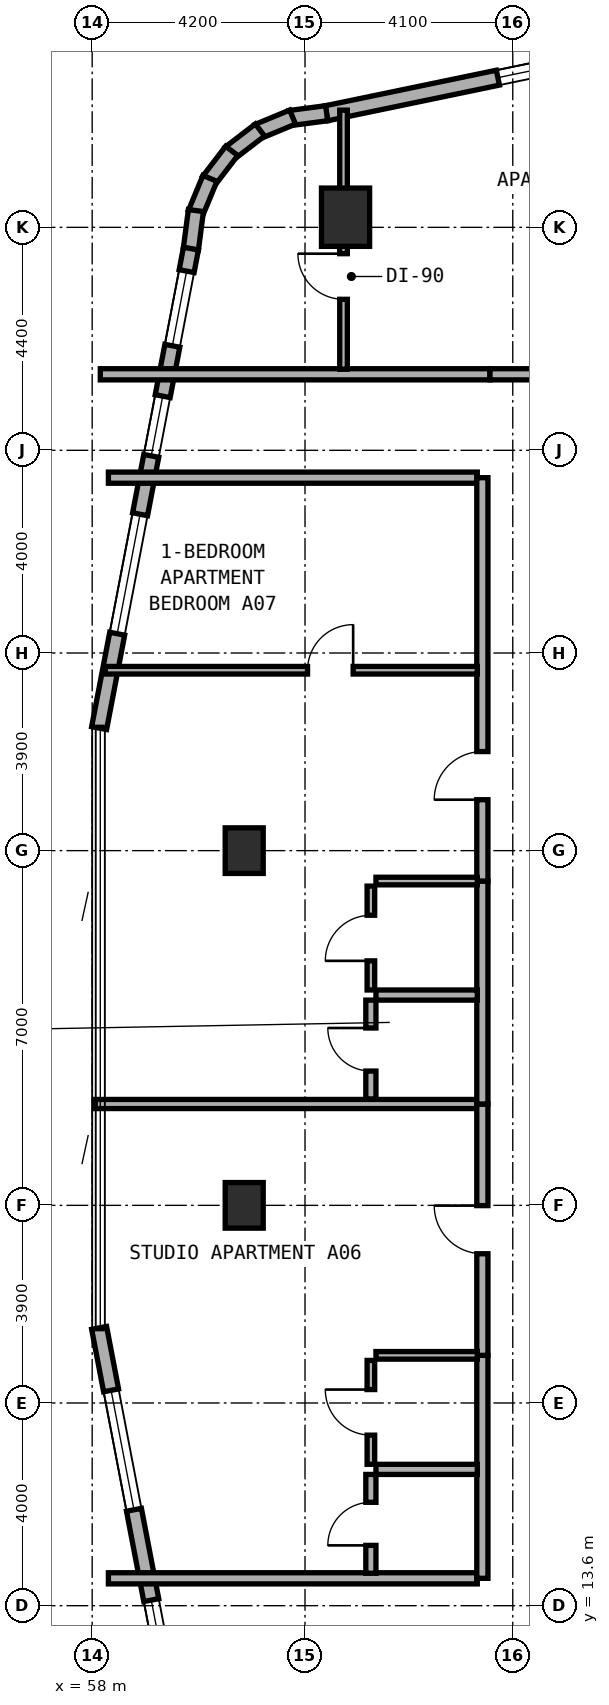
"""IFC4 building model, lengths in metres.
Left out: names, types, materials, properties, quantities, classifications, styles, units other than length and angle.
Written with IfcOpenShell. Run it as: python <this file> out.ifc"""

import sys

from ifc_helpers import new_model, si_unit, direction, frame, frame_2d, origin, origin_2d, place, context, subcontext, project, spatial, rectangle, extrude, element, fill, save


model = new_model("IFC4")
c1 = context("Model", 3, precision=1e-05, world=origin(), true_north=direction((0.0, 1.0)))
c2 = subcontext(c1, "Body", "Model", "MODEL_VIEW")
j1 = project(units=[si_unit("LENGTHUNIT", "METRE"), si_unit("PLANEANGLEUNIT", "RADIAN")], contexts=[c1])
p1 = place(None, origin())
s1 = spatial("IfcSite", under=j1, at=p1, CompositionType="ELEMENT")
p2 = place(p1, origin())
s2 = spatial("IfcBuilding", under=s1, at=p2, CompositionType="ELEMENT")
p3 = place(p2, frame((0.0, 0.0, 59.0)))
s3 = spatial("IfcBuildingStorey", under=s2, at=p3, CompositionType="ELEMENT", Elevation=59.0)
for number, where, z_axis, x_axis in (
    (1, (61.0, 21.5, 0.0), (0.0, 0.0, 1.0), (1.0, 0.0, 0.0)),
    (2, (61.0, 28.5, 0.0), (0.0, 0.0, 1.0), (1.0, 0.0, 0.0)),
):
    element("IfcColumn", number, at=place(p3, frame(where, z_axis=z_axis, x_axis=x_axis)), inside=s3, PredefinedType="COLUMN", context=c2, shape_type="SweptSolid", body=[
        extrude(rectangle(XDim=0.75, YDim=0.9, at=origin_2d()), origin(), (0.0, 0.0, 1.0), 3.5),
    ])
p4 = place(p3, frame((63.0, 41.0, 0.0), z_axis=(0.0, 0.0, 1.0), x_axis=(1.0, 0.0, 0.0)))
e3 = element("IfcColumn", 3, at=p4, inside=s3, PredefinedType="COLUMN", context=c2, shape_type="SweptSolid", body=[
    extrude(rectangle(XDim=0.95, YDim=1.15, at=origin_2d()), origin(), (0.0, 0.0, 1.0), 3.5),
])
p5 = place(p3, frame((71.326, 44.858, 0.0), z_axis=(0.0, 0.0, 1.0), x_axis=(-0.979124350489, -0.203262161453, 0.0)))
e4 = element("IfcWall", 4, at=p5, inside=s3, PredefinedType="STANDARD", context=c2, shape_type="SweptSolid", body=[
    extrude(rectangle(XDim=8.889, YDim=0.3, at=frame_2d((4.445, 0.0))), origin(), (0.0, 0.0, 1.0), 3.25),
])
p6 = place(p5, frame((3.033, 0.0, 0.8)))
e5 = element("IfcOpeningElement", 5, at=p6, cuts=e4, PredefinedType="OPENING", context=c2, shape_type="SweptSolid", body=[
    extrude(rectangle(XDim=2.4, YDim=1.6, at=frame_2d((1.2, 0.8))), frame((0.0, 0.16, 0.0), z_axis=(0.0, -1.0, 0.0), x_axis=(1.0, 0.0, 0.0)), (0.0, 0.0, 1.0), 0.32),
])
p7 = place(p3, frame((62.627, 43.052, 0.0), z_axis=(0.0, 0.0, 1.0), x_axis=(-0.991480488834, -0.130255288807, 0.0)))
e6 = element("IfcWall", 6, at=p7, inside=s3, PredefinedType="STANDARD", context=c2, shape_type="SweptSolid", body=[
    extrude(rectangle(XDim=0.729, YDim=0.3, at=frame_2d((0.365, 0.0))), origin(), (0.0, 0.0, 1.0), 3.25),
])
for number, where, z_axis, x_axis in (
    (7, (61.955, 42.976, 0.0), (0.0, 0.0, 1.0), (-0.924, -0.384, 0.0)),
    (8, (61.311, 42.721, 0.0), (0.0, 0.0, 1.0), (-0.794, -0.608, 0.0)),
    (9, (60.754, 42.309, 0.0), (0.0, 0.0, 1.0), (-0.608, -0.794, 0.0)),
    (10, (60.324, 41.766, 0.0), (0.0, 0.0, 1.0), (-0.383, -0.924, 0.0)),
):
    element("IfcWall", number, at=place(p3, frame(where, z_axis=z_axis, x_axis=x_axis)), inside=s3, PredefinedType="STANDARD", context=c2, shape_type="SweptSolid", body=[
        extrude(rectangle(XDim=0.746, YDim=0.3, at=frame_2d((0.373, 0.0))), origin(), (0.0, 0.0, 1.0), 3.25),
    ])
p8 = place(p3, frame((60.047, 41.131, 0.0), z_axis=(0.0, 0.0, 1.0), x_axis=(-0.129653178221, -0.991559404866, 0.0)))
e11 = element("IfcWall", 11, at=p8, inside=s3, PredefinedType="STANDARD", context=c2, shape_type="SweptSolid", body=[
    extrude(rectangle(XDim=0.764, YDim=0.3, at=frame_2d((0.382, 0.0))), origin(), (0.0, 0.0, 1.0), 3.25),
])
p9 = place(p3, frame((59.949, 40.38, 0.0), z_axis=(0.0, 0.0, 1.0), x_axis=(-0.188087874316, -0.982152203854, 0.0)))
e12 = element("IfcWall", 12, at=p9, inside=s3, PredefinedType="STANDARD", context=c2, shape_type="SweptSolid", body=[
    extrude(rectangle(XDim=9.634, YDim=0.3, at=frame_2d((4.817, 0.0))), origin(), (0.0, 0.0, 1.0), 3.25),
])
p10 = place(p9, frame((0.452, 0.0, 0.85)))
e13 = element("IfcOpeningElement", 13, at=p10, cuts=e12, PredefinedType="OPENING", context=c2, shape_type="SweptSolid", body=[
    extrude(rectangle(XDim=1.5, YDim=1.5, at=frame_2d((0.75, 0.75))), frame((0.0, 0.16, 0.0), z_axis=(0.0, -1.0, 0.0), x_axis=(1.0, 0.0, 0.0)), (0.0, 0.0, 1.0), 0.32),
])
p11 = place(p9, frame((2.964, 0.0, 0.85)))
e14 = element("IfcOpeningElement", 14, at=p11, cuts=e12, PredefinedType="OPENING", context=c2, shape_type="SweptSolid", body=[
    extrude(rectangle(XDim=1.2, YDim=1.5, at=frame_2d((0.6, 0.75))), frame((0.0, 0.16, 0.0), z_axis=(0.0, -1.0, 0.0), x_axis=(1.0, 0.0, 0.0)), (0.0, 0.0, 1.0), 0.32),
])
p12 = place(p9, frame((5.337, 0.0, 0.8)))
e15 = element("IfcOpeningElement", 15, at=p12, cuts=e12, PredefinedType="OPENING", context=c2, shape_type="SweptSolid", body=[
    extrude(rectangle(XDim=2.4, YDim=1.6, at=frame_2d((1.2, 0.8))), frame((0.0, 0.16, 0.0), z_axis=(0.0, -1.0, 0.0), x_axis=(1.0, 0.0, 0.0)), (0.0, 0.0, 1.0), 0.32),
])
p13 = place(p3, frame((58.137, 19.082, 0.0), z_axis=(0.0, 0.0, 1.0), x_axis=(0.188087874316, -0.982152203854, 0.0)))
e16 = element("IfcWall", 16, at=p13, inside=s3, PredefinedType="STANDARD", context=c2, shape_type="SweptSolid", body=[
    extrude(rectangle(XDim=9.634, YDim=0.3, at=frame_2d((4.817, 0.0))), origin(), (0.0, 0.0, 1.0), 3.25),
])
p14 = place(p13, frame((1.255, 0.0, 0.8)))
e17 = element("IfcOpeningElement", 17, at=p14, cuts=e16, PredefinedType="OPENING", context=c2, shape_type="SweptSolid", body=[
    extrude(rectangle(XDim=2.4, YDim=1.6, at=frame_2d((1.2, 0.8))), frame((0.0, 0.16, 0.0), z_axis=(0.0, -1.0, 0.0), x_axis=(1.0, 0.0, 0.0)), (0.0, 0.0, 1.0), 0.32),
])
p15 = place(p13, frame((5.47, 0.0, 0.85)))
e18 = element("IfcOpeningElement", 18, at=p15, cuts=e16, PredefinedType="OPENING", context=c2, shape_type="SweptSolid", body=[
    extrude(rectangle(XDim=1.2, YDim=1.5, at=frame_2d((0.6, 0.75))), frame((0.0, 0.16, 0.0), z_axis=(0.0, -1.0, 0.0), x_axis=(1.0, 0.0, 0.0)), (0.0, 0.0, 1.0), 0.32),
])
p16 = place(p13, frame((7.682, 0.0, 0.85)))
e19 = element("IfcOpeningElement", 19, at=p16, cuts=e16, PredefinedType="OPENING", context=c2, shape_type="SweptSolid", body=[
    extrude(rectangle(XDim=1.5, YDim=1.5, at=frame_2d((0.75, 0.75))), frame((0.0, 0.16, 0.0), z_axis=(0.0, -1.0, 0.0), x_axis=(1.0, 0.0, 0.0)), (0.0, 0.0, 1.0), 0.32),
])
p17 = place(p3, frame((58.16, 37.9, 0.0), z_axis=(0.0, 0.0, 1.0), x_axis=(1.0, 0.0, 0.0)))
e20 = element("IfcWall", 20, at=p17, inside=s3, PredefinedType="SOLIDWALL", context=c2, shape_type="SweptSolid", body=[
    extrude(rectangle(XDim=7.69, YDim=0.22, at=frame_2d((3.845, 0.0))), origin(), (0.0, 0.0, 1.0), 2.865),
])
p18 = place(p3, frame((65.85, 37.9, 0.0), z_axis=(0.0, 0.0, 1.0), x_axis=(1.0, 0.0, 0.0)))
e21 = element("IfcWall", 21, at=p18, inside=s3, PredefinedType="SOLIDWALL", context=c2, shape_type="SweptSolid", body=[
    extrude(rectangle(XDim=4.57, YDim=0.22, at=frame_2d((2.285, 0.0))), origin(), (0.0, 0.0, 1.0), 3.22),
])
p19 = place(p18, frame((1.81, 0.0, 0.0)))
e22 = element("IfcOpeningElement", 22, at=p19, cuts=e21, PredefinedType="OPENING", context=c2, shape_type="SweptSolid", body=[
    extrude(rectangle(XDim=0.95, YDim=2.1, at=frame_2d((0.475, 1.05))), frame((0.0, 0.12, 0.0), z_axis=(0.0, -1.0, 0.0), x_axis=(1.0, 0.0, 0.0)), (0.0, 0.0, 1.0), 0.24),
])
p20 = place(p3, frame((62.96, 38.0, 0.0), z_axis=(0.0, 0.0, 1.0), x_axis=(0.0, 1.0, 0.0)))
e23 = element("IfcWall", 23, at=p20, inside=s3, PredefinedType="PARTITIONING", context=c2, shape_type="SweptSolid", body=[
    extrude(rectangle(XDim=5.113, YDim=0.15, at=frame_2d((2.557, 0.0))), origin(), (0.0, 0.0, 1.0), 2.865),
])
p21 = place(p20, frame((1.38, 0.0, 0.0)))
e24 = element("IfcOpeningElement", 24, at=p21, cuts=e23, PredefinedType="OPENING", context=c2, shape_type="SweptSolid", body=[
    extrude(rectangle(XDim=0.9, YDim=2.1, at=frame_2d((0.45, 1.05))), frame((0.0, 0.085, 0.0), z_axis=(0.0, -1.0, 0.0), x_axis=(1.0, 0.0, 0.0)), (0.0, 0.0, 1.0), 0.17),
])
for number, where, z_axis, x_axis in (
    (25, (58.32, 14.14, 0.0), (0.0, 0.0, 1.0), (1.0, 0.0, 0.0)),
    (26, (58.32, 35.86, 0.0), (0.0, 0.0, 1.0), (1.0, 0.0, 0.0)),
):
    element("IfcWall", number, at=place(p3, frame(where, z_axis=z_axis, x_axis=x_axis)), inside=s3, PredefinedType="SOLIDWALL", context=c2, shape_type="SweptSolid", body=[
        extrude(rectangle(XDim=7.28, YDim=0.22, at=frame_2d((3.64, 0.0))), origin(), (0.0, 0.0, 1.0), 2.865),
    ])
p22 = place(p3, frame((58.06, 23.5, 0.0), z_axis=(0.0, 0.0, 1.0), x_axis=(1.0, 0.0, 0.0)))
e27 = element("IfcWall", 27, at=p22, inside=s3, PredefinedType="SOLIDWALL", context=c2, shape_type="SweptSolid", body=[
    extrude(rectangle(XDim=7.64, YDim=0.18, at=frame_2d((3.82, 0.0))), origin(), (0.0, 0.0, 1.0), 2.865),
])
p23 = place(p3, frame((65.7, 14.14, 0.0), z_axis=(0.0, 0.0, 1.0), x_axis=(0.0, 1.0, 0.0)))
e28 = element("IfcWall", 28, at=p23, inside=s3, PredefinedType="SOLIDWALL", context=c2, shape_type="SweptSolid", body=[
    extrude(rectangle(XDim=4.4, YDim=0.22, at=frame_2d((2.2, 0.0))), origin(), (0.0, 0.0, 1.0), 3.22),
])
p24 = place(p3, frame((65.7, 18.54, 0.0), z_axis=(0.0, 0.0, 1.0), x_axis=(0.0, 1.0, 0.0)))
e29 = element("IfcWall", 29, at=p24, inside=s3, PredefinedType="SOLIDWALL", context=c2, shape_type="SweptSolid", body=[
    extrude(rectangle(XDim=4.96, YDim=0.22, at=frame_2d((2.48, 0.0))), origin(), (0.0, 0.0, 1.0), 2.725),
])
p25 = place(p24, frame((2.005, 0.0, 0.0)))
e30 = element("IfcOpeningElement", 30, at=p25, cuts=e29, PredefinedType="OPENING", context=c2, shape_type="SweptSolid", body=[
    extrude(rectangle(XDim=0.95, YDim=2.1, at=frame_2d((0.475, 1.05))), frame((0.0, 0.12, 0.0), z_axis=(0.0, -1.0, 0.0), x_axis=(1.0, 0.0, 0.0)), (0.0, 0.0, 1.0), 0.24),
])
p26 = place(p3, frame((63.6, 16.29, 0.0), z_axis=(0.0, 0.0, 1.0), x_axis=(1.0, 0.0, 0.0)))
e31 = element("IfcWall", 31, at=p26, inside=s3, PredefinedType="PLUMBINGWALL", context=c2, shape_type="SweptSolid", body=[
    extrude(rectangle(XDim=2.0, YDim=0.2, at=frame_2d((1.0, 0.0))), origin(), (0.0, 0.0, 1.0), 3.22),
])
p27 = place(p3, frame((63.6, 18.54, 0.0), z_axis=(0.0, 0.0, 1.0), x_axis=(1.0, 0.0, 0.0)))
e32 = element("IfcWall", 32, at=p27, inside=s3, PredefinedType="PARTITIONING", context=c2, shape_type="SweptSolid", body=[
    extrude(rectangle(XDim=2.0, YDim=0.15, at=frame_2d((1.0, 0.0))), origin(), (0.0, 0.0, 1.0), 3.22),
])
p28 = place(p3, frame((63.5, 14.24, 0.0), z_axis=(0.0, 0.0, 1.0), x_axis=(0.0, 1.0, 0.0)))
e33 = element("IfcWall", 33, at=p28, inside=s3, PredefinedType="PLUMBINGWALL", context=c2, shape_type="SweptSolid", body=[
    extrude(rectangle(XDim=1.95, YDim=0.2, at=frame_2d((0.975, 0.0))), origin(), (0.0, 0.0, 1.0), 3.22),
])
p29 = place(p28, frame((0.55, 0.0, 0.0)))
e34 = element("IfcOpeningElement", 34, at=p29, cuts=e33, PredefinedType="OPENING", context=c2, shape_type="SweptSolid", body=[
    extrude(rectangle(XDim=0.85, YDim=2.1, at=frame_2d((0.425, 1.05))), frame((0.0, 0.11, 0.0), z_axis=(0.0, -1.0, 0.0), x_axis=(1.0, 0.0, 0.0)), (0.0, 0.0, 1.0), 0.22),
])
p30 = place(p3, frame((63.5, 16.39, 0.0), z_axis=(0.0, 0.0, 1.0), x_axis=(0.0, 1.0, 0.0)))
e35 = element("IfcWall", 35, at=p30, inside=s3, PredefinedType="PARTITIONING", context=c2, shape_type="SweptSolid", body=[
    extrude(rectangle(XDim=2.05, YDim=0.15, at=frame_2d((1.025, 0.0))), origin(), (0.0, 0.0, 1.0), 3.22),
])
p31 = place(p30, frame((0.575, 0.0, 0.0)))
e36 = element("IfcOpeningElement", 36, at=p31, cuts=e35, PredefinedType="OPENING", context=c2, shape_type="SweptSolid", body=[
    extrude(rectangle(XDim=0.9, YDim=2.1, at=frame_2d((0.45, 1.05))), frame((0.0, 0.085, 0.0), z_axis=(0.0, -1.0, 0.0), x_axis=(1.0, 0.0, 0.0)), (0.0, 0.0, 1.0), 0.17),
])
p32 = place(p3, frame((65.7, 23.5, 0.0), z_axis=(0.0, 0.0, 1.0), x_axis=(0.0, 1.0, 0.0)))
e37 = element("IfcWall", 37, at=p32, inside=s3, PredefinedType="SOLIDWALL", context=c2, shape_type="SweptSolid", body=[
    extrude(rectangle(XDim=4.4, YDim=0.22, at=frame_2d((2.2, 0.0))), origin(), (0.0, 0.0, 1.0), 3.22),
])
p33 = place(p3, frame((65.7, 27.9, 0.0), z_axis=(0.0, 0.0, 1.0), x_axis=(0.0, 1.0, 0.0)))
e38 = element("IfcWall", 38, at=p33, inside=s3, PredefinedType="SOLIDWALL", context=c2, shape_type="SweptSolid", body=[
    extrude(rectangle(XDim=7.96, YDim=0.22, at=frame_2d((3.98, 0.0))), origin(), (0.0, 0.0, 1.0), 2.725),
])
p34 = place(p33, frame((1.605, 0.0, 0.0)))
e39 = element("IfcOpeningElement", 39, at=p34, cuts=e38, PredefinedType="OPENING", context=c2, shape_type="SweptSolid", body=[
    extrude(rectangle(XDim=0.95, YDim=2.1, at=frame_2d((0.475, 1.05))), frame((0.0, 0.12, 0.0), z_axis=(0.0, -1.0, 0.0), x_axis=(1.0, 0.0, 0.0)), (0.0, 0.0, 1.0), 0.24),
])
p35 = place(p3, frame((58.26, 32.06, 0.0), z_axis=(0.0, 0.0, 1.0), x_axis=(1.0, 0.0, 0.0)))
e40 = element("IfcWall", 40, at=p35, inside=s3, PredefinedType="PARTITIONING", context=c2, shape_type="SweptSolid", body=[
    extrude(rectangle(XDim=7.34, YDim=0.15, at=frame_2d((3.67, 0.0))), origin(), (0.0, 0.0, 1.0), 2.865),
])
p36 = place(p35, frame((3.99, 0.0, 0.0)))
e41 = element("IfcOpeningElement", 41, at=p36, cuts=e40, PredefinedType="OPENING", context=c2, shape_type="SweptSolid", body=[
    extrude(rectangle(XDim=0.9, YDim=2.1, at=frame_2d((0.45, 1.05))), frame((0.0, 0.085, 0.0), z_axis=(0.0, -1.0, 0.0), x_axis=(1.0, 0.0, 0.0)), (0.0, 0.0, 1.0), 0.17),
])
p37 = place(p3, frame((63.6, 25.65, 0.0), z_axis=(0.0, 0.0, 1.0), x_axis=(1.0, 0.0, 0.0)))
e42 = element("IfcWall", 42, at=p37, inside=s3, PredefinedType="PLUMBINGWALL", context=c2, shape_type="SweptSolid", body=[
    extrude(rectangle(XDim=2.0, YDim=0.2, at=frame_2d((1.0, 0.0))), origin(), (0.0, 0.0, 1.0), 3.22),
])
p38 = place(p3, frame((63.6, 27.9, 0.0), z_axis=(0.0, 0.0, 1.0), x_axis=(1.0, 0.0, 0.0)))
e43 = element("IfcWall", 43, at=p38, inside=s3, PredefinedType="PARTITIONING", context=c2, shape_type="SweptSolid", body=[
    extrude(rectangle(XDim=2.0, YDim=0.15, at=frame_2d((1.0, 0.0))), origin(), (0.0, 0.0, 1.0), 3.22),
])
p39 = place(p3, frame((63.5, 23.6, 0.0), z_axis=(0.0, 0.0, 1.0), x_axis=(0.0, 1.0, 0.0)))
e44 = element("IfcWall", 44, at=p39, inside=s3, PredefinedType="PLUMBINGWALL", context=c2, shape_type="SweptSolid", body=[
    extrude(rectangle(XDim=1.95, YDim=0.2, at=frame_2d((0.975, 0.0))), origin(), (0.0, 0.0, 1.0), 3.22),
])
p40 = place(p39, frame((0.55, 0.0, 0.0)))
e45 = element("IfcOpeningElement", 45, at=p40, cuts=e44, PredefinedType="OPENING", context=c2, shape_type="SweptSolid", body=[
    extrude(rectangle(XDim=0.85, YDim=2.1, at=frame_2d((0.425, 1.05))), frame((0.0, 0.11, 0.0), z_axis=(0.0, -1.0, 0.0), x_axis=(1.0, 0.0, 0.0)), (0.0, 0.0, 1.0), 0.22),
])
p41 = place(p3, frame((63.5, 25.75, 0.0), z_axis=(0.0, 0.0, 1.0), x_axis=(0.0, 1.0, 0.0)))
e46 = element("IfcWall", 46, at=p41, inside=s3, PredefinedType="PARTITIONING", context=c2, shape_type="SweptSolid", body=[
    extrude(rectangle(XDim=2.05, YDim=0.15, at=frame_2d((1.025, 0.0))), origin(), (0.0, 0.0, 1.0), 3.22),
])
p42 = place(p41, frame((0.575, 0.0, 0.0)))
e47 = element("IfcOpeningElement", 47, at=p42, cuts=e46, PredefinedType="OPENING", context=c2, shape_type="SweptSolid", body=[
    extrude(rectangle(XDim=0.9, YDim=2.1, at=frame_2d((0.45, 1.05))), frame((0.0, 0.085, 0.0), z_axis=(0.0, -1.0, 0.0), x_axis=(1.0, 0.0, 0.0)), (0.0, 0.0, 1.0), 0.17),
])
p43 = place(p6, origin())
e48 = element("IfcWindow", 48, at=p43, inside=s3, PartitioningType="SINGLE_PANEL", PredefinedType="WINDOW", context=c2, shape_type="SweptSolid", body=[
    extrude(rectangle(XDim=2.4, YDim=1.6, at=frame_2d((1.2, 0.8))), frame((0.0, 0.03, 0.0), z_axis=(0.0, -1.0, 0.0), x_axis=(1.0, 0.0, 0.0)), (0.0, 0.0, 1.0), 0.06),
])
fill(e5, e48)
p44 = place(p10, origin())
e49 = element("IfcWindow", 49, at=p44, inside=s3, PartitioningType="SINGLE_PANEL", PredefinedType="WINDOW", context=c2, shape_type="SweptSolid", body=[
    extrude(rectangle(XDim=1.5, YDim=1.5, at=frame_2d((0.75, 0.75))), frame((0.0, 0.03, 0.0), z_axis=(0.0, -1.0, 0.0), x_axis=(1.0, 0.0, 0.0)), (0.0, 0.0, 1.0), 0.06),
])
fill(e13, e49)
p45 = place(p11, origin())
e50 = element("IfcWindow", 50, at=p45, inside=s3, PartitioningType="SINGLE_PANEL", PredefinedType="WINDOW", context=c2, shape_type="SweptSolid", body=[
    extrude(rectangle(XDim=1.2, YDim=1.5, at=frame_2d((0.6, 0.75))), frame((0.0, 0.03, 0.0), z_axis=(0.0, -1.0, 0.0), x_axis=(1.0, 0.0, 0.0)), (0.0, 0.0, 1.0), 0.06),
])
fill(e14, e50)
p46 = place(p12, origin())
e51 = element("IfcWindow", 51, at=p46, inside=s3, PartitioningType="SINGLE_PANEL", PredefinedType="WINDOW", context=c2, shape_type="SweptSolid", body=[
    extrude(rectangle(XDim=2.4, YDim=1.6, at=frame_2d((1.2, 0.8))), frame((0.0, 0.03, 0.0), z_axis=(0.0, -1.0, 0.0), x_axis=(1.0, 0.0, 0.0)), (0.0, 0.0, 1.0), 0.06),
])
fill(e15, e51)
p47 = place(p14, origin())
e52 = element("IfcWindow", 52, at=p47, inside=s3, PartitioningType="SINGLE_PANEL", PredefinedType="WINDOW", context=c2, shape_type="SweptSolid", body=[
    extrude(rectangle(XDim=2.4, YDim=1.6, at=frame_2d((1.2, 0.8))), frame((0.0, 0.03, 0.0), z_axis=(0.0, -1.0, 0.0), x_axis=(1.0, 0.0, 0.0)), (0.0, 0.0, 1.0), 0.06),
])
fill(e17, e52)
p48 = place(p15, origin())
e53 = element("IfcWindow", 53, at=p48, inside=s3, PartitioningType="SINGLE_PANEL", PredefinedType="WINDOW", context=c2, shape_type="SweptSolid", body=[
    extrude(rectangle(XDim=1.2, YDim=1.5, at=frame_2d((0.6, 0.75))), frame((0.0, 0.03, 0.0), z_axis=(0.0, -1.0, 0.0), x_axis=(1.0, 0.0, 0.0)), (0.0, 0.0, 1.0), 0.06),
])
fill(e18, e53)
p49 = place(p21, origin())
e54 = element("IfcDoor", 54, at=p49, inside=s3, OperationType="SINGLE_SWING_RIGHT", PredefinedType="DOOR", context=c2, shape_type="SweptSolid", body=[
    extrude(rectangle(XDim=0.9, YDim=2.1, at=frame_2d((0.45, 1.05))), frame((0.0, 0.025, 0.0), z_axis=(0.0, -1.0, 0.0), x_axis=(1.0, 0.0, 0.0)), (0.0, 0.0, 1.0), 0.05),
])
fill(e24, e54)
p50 = place(p25, origin())
e55 = element("IfcDoor", 55, at=p50, inside=s3, OperationType="SINGLE_SWING_RIGHT", PredefinedType="DOOR", context=c2, shape_type="SweptSolid", body=[
    extrude(rectangle(XDim=0.95, YDim=2.1, at=frame_2d((0.475, 1.05))), frame((0.0, 0.025, 0.0), z_axis=(0.0, -1.0, 0.0), x_axis=(1.0, 0.0, 0.0)), (0.0, 0.0, 1.0), 0.05),
])
fill(e30, e55)
p51 = place(p29, origin())
e56 = element("IfcDoor", 56, at=p51, inside=s3, OperationType="SINGLE_SWING_LEFT", PredefinedType="DOOR", context=c2, shape_type="SweptSolid", body=[
    extrude(rectangle(XDim=0.85, YDim=2.1, at=frame_2d((0.425, 1.05))), frame((0.0, 0.025, 0.0), z_axis=(0.0, -1.0, 0.0), x_axis=(1.0, 0.0, 0.0)), (0.0, 0.0, 1.0), 0.05),
])
fill(e34, e56)
p52 = place(p31, origin())
e57 = element("IfcDoor", 57, at=p52, inside=s3, OperationType="SINGLE_SWING_RIGHT", PredefinedType="DOOR", context=c2, shape_type="SweptSolid", body=[
    extrude(rectangle(XDim=0.9, YDim=2.1, at=frame_2d((0.45, 1.05))), frame((0.0, 0.025, 0.0), z_axis=(0.0, -1.0, 0.0), x_axis=(1.0, 0.0, 0.0)), (0.0, 0.0, 1.0), 0.05),
])
fill(e36, e57)
p53 = place(p34, origin())
e58 = element("IfcDoor", 58, at=p53, inside=s3, OperationType="SINGLE_SWING_LEFT", PredefinedType="DOOR", context=c2, shape_type="SweptSolid", body=[
    extrude(rectangle(XDim=0.95, YDim=2.1, at=frame_2d((0.475, 1.05))), frame((0.0, 0.025, 0.0), z_axis=(0.0, -1.0, 0.0), x_axis=(1.0, 0.0, 0.0)), (0.0, 0.0, 1.0), 0.05),
])
fill(e39, e58)
p54 = place(p36, origin())
e59 = element("IfcDoor", 59, at=p54, inside=s3, OperationType="SINGLE_SWING_RIGHT", PredefinedType="DOOR", context=c2, shape_type="SweptSolid", body=[
    extrude(rectangle(XDim=0.9, YDim=2.1, at=frame_2d((0.45, 1.05))), frame((0.0, 0.025, 0.0), z_axis=(0.0, -1.0, 0.0), x_axis=(1.0, 0.0, 0.0)), (0.0, 0.0, 1.0), 0.05),
])
fill(e41, e59)
p55 = place(p40, origin())
e60 = element("IfcDoor", 60, at=p55, inside=s3, OperationType="SINGLE_SWING_RIGHT", PredefinedType="DOOR", context=c2, shape_type="SweptSolid", body=[
    extrude(rectangle(XDim=0.85, YDim=2.1, at=frame_2d((0.425, 1.05))), frame((0.0, 0.025, 0.0), z_axis=(0.0, -1.0, 0.0), x_axis=(1.0, 0.0, 0.0)), (0.0, 0.0, 1.0), 0.05),
])
fill(e45, e60)
p56 = place(p42, origin())
e61 = element("IfcDoor", 61, at=p56, inside=s3, OperationType="SINGLE_SWING_LEFT", PredefinedType="DOOR", context=c2, shape_type="SweptSolid", body=[
    extrude(rectangle(XDim=0.9, YDim=2.1, at=frame_2d((0.45, 1.05))), frame((0.0, 0.025, 0.0), z_axis=(0.0, -1.0, 0.0), x_axis=(1.0, 0.0, 0.0)), (0.0, 0.0, 1.0), 0.05),
])
fill(e47, e61)
save(model, sys.argv[1])
